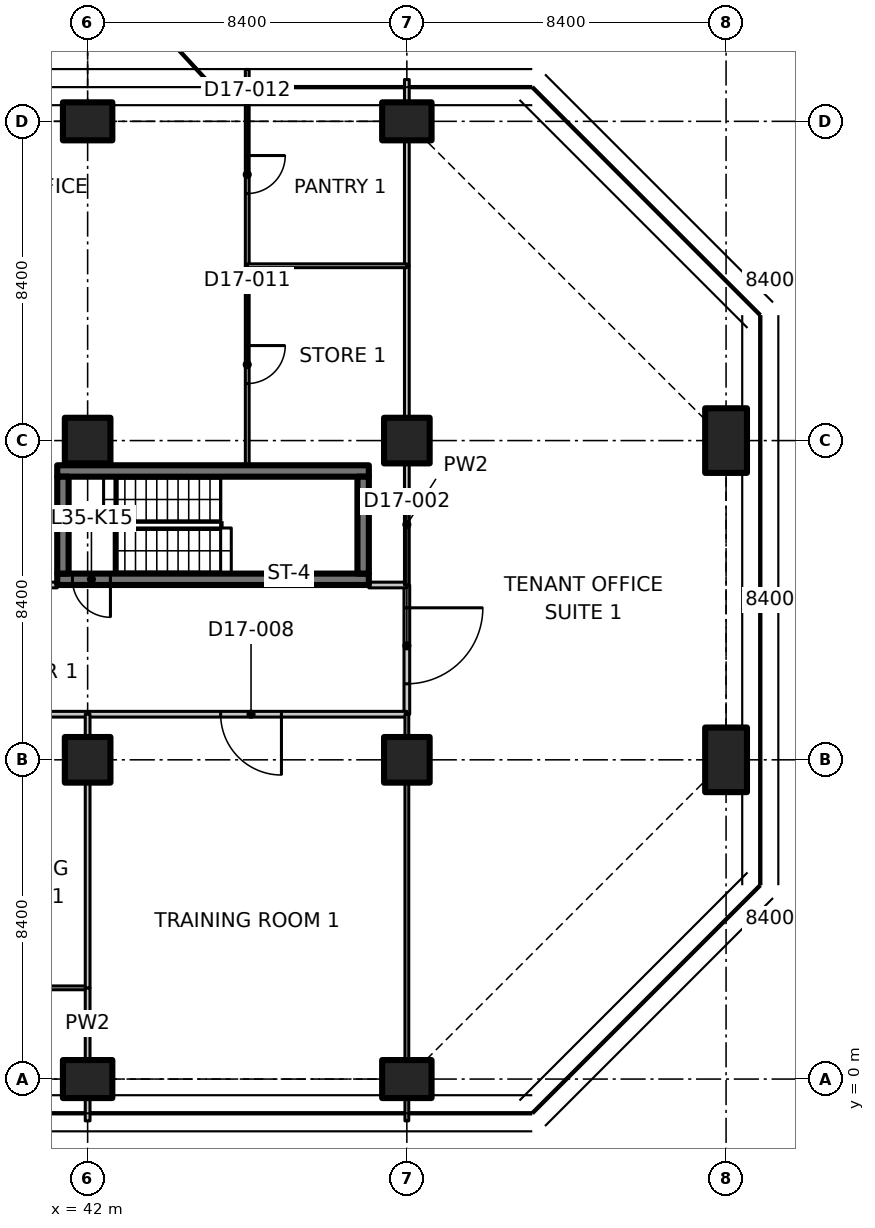
"""IFC4 building model, lengths in metres.
Left out: names, types, materials, properties, quantities, classifications, styles, units other than length and angle.
Written with IfcOpenShell. Run it as: python <this file> out.ifc"""

import sys

from ifc_helpers import new_model, si_unit, direction, frame, frame_2d, origin, origin_2d, place, context, subcontext, project, spatial, polyline, rectangle, outline, extrude, element, fill, save


model = new_model("IFC4")
c1 = context("Model", 3, precision=1e-05, world=origin(), true_north=direction((0.0, 1.0)))
c2 = subcontext(c1, "Body", "Model", "MODEL_VIEW")
j1 = project(units=[si_unit("LENGTHUNIT", "METRE"), si_unit("PLANEANGLEUNIT", "RADIAN")], contexts=[c1])
p1 = place(None, origin())
s1 = spatial("IfcSite", under=j1, at=p1, CompositionType="ELEMENT")
p2 = place(p1, origin())
s2 = spatial("IfcBuilding", under=s1, at=p2, CompositionType="ELEMENT")
p3 = place(p2, frame((0.0, 0.0, 142.1)))
s3 = spatial("IfcBuildingStorey", under=s2, at=p3, CompositionType="ELEMENT", Elevation=142.1)
p4 = place(p3, frame((42.0, 0.0, 0.0), z_axis=(0.0, 0.0, 1.0), x_axis=(0.0, 1.0, 0.0)))
e1 = element("IfcColumn", 1, at=p4, inside=s3, PredefinedType="COLUMN", context=c2, shape_type="SweptSolid", body=[
    extrude(rectangle(XDim=1.0, YDim=1.3, at=origin_2d()), origin(), (0.0, 0.0, 1.0), 3.35),
])
for number, where, z_axis, x_axis in (
    (2, (42.0, 8.4, 0.0), (0.0, 0.0, 1.0), (1.0, 0.0, 0.0)),
    (3, (42.0, 16.8, 0.0), (0.0, 0.0, 1.0), (1.0, 0.0, 0.0)),
):
    element("IfcColumn", number, at=place(p3, frame(where, z_axis=z_axis, x_axis=x_axis)), inside=s3, PredefinedType="COLUMN", context=c2, shape_type="SweptSolid", body=[
        extrude(rectangle(XDim=1.2, YDim=1.2, at=origin_2d()), origin(), (0.0, 0.0, 1.0), 3.35),
    ])
for number, where, z_axis, x_axis in (
    (4, (42.0, 25.2, 0.0), (0.0, 0.0, 1.0), (0.0, 1.0, 0.0)),
    (5, (50.4, 0.0, 0.0), (0.0, 0.0, 1.0), (0.0, 1.0, 0.0)),
):
    element("IfcColumn", number, at=place(p3, frame(where, z_axis=z_axis, x_axis=x_axis)), inside=s3, PredefinedType="COLUMN", context=c2, shape_type="SweptSolid", body=[
        extrude(rectangle(XDim=1.0, YDim=1.3, at=origin_2d()), origin(), (0.0, 0.0, 1.0), 3.35),
    ])
for number, where, z_axis, x_axis in (
    (6, (50.4, 8.4, 0.0), (0.0, 0.0, 1.0), (1.0, 0.0, 0.0)),
    (7, (50.4, 16.8, 0.0), (0.0, 0.0, 1.0), (1.0, 0.0, 0.0)),
):
    element("IfcColumn", number, at=place(p3, frame(where, z_axis=z_axis, x_axis=x_axis)), inside=s3, PredefinedType="COLUMN", context=c2, shape_type="SweptSolid", body=[
        extrude(rectangle(XDim=1.2, YDim=1.2, at=origin_2d()), origin(), (0.0, 0.0, 1.0), 3.35),
    ])
p5 = place(p3, frame((50.4, 25.2, 0.0), z_axis=(0.0, 0.0, 1.0), x_axis=(0.0, 1.0, 0.0)))
e8 = element("IfcColumn", 8, at=p5, inside=s3, PredefinedType="COLUMN", context=c2, shape_type="SweptSolid", body=[
    extrude(rectangle(XDim=1.0, YDim=1.3, at=origin_2d()), origin(), (0.0, 0.0, 1.0), 3.35),
])
for number, where, z_axis, x_axis in (
    (9, (58.8, 8.4, 0.0), (0.0, 0.0, 1.0), (1.0, 0.0, 0.0)),
    (10, (58.8, 16.8, 0.0), (0.0, 0.0, 1.0), (1.0, 0.0, 0.0)),
):
    element("IfcColumn", number, at=place(p3, frame(where, z_axis=z_axis, x_axis=x_axis)), inside=s3, PredefinedType="COLUMN", context=c2, shape_type="SweptSolid", body=[
        extrude(rectangle(XDim=1.1, YDim=1.7, at=origin_2d()), origin(), (0.0, 0.0, 1.0), 3.35),
    ])
p6 = place(p3, frame((49.4, 13.15, 0.0), z_axis=(0.0, 0.0, 1.0), x_axis=(-1.0, 0.0, 0.0)))
e11 = element("IfcWall", 11, at=p6, inside=s3, PredefinedType="SHEAR", context=c2, shape_type="SweptSolid", body=[
    extrude(rectangle(XDim=8.2, YDim=0.3, at=frame_2d((4.1, 0.0))), origin(), (0.0, 0.0, 1.0), 3.35),
])
p7 = place(p6, frame((6.8, 0.0, 0.0)))
e12 = element("IfcOpeningElement", 12, at=p7, cuts=e11, PredefinedType="OPENING", context=c2, shape_type="SweptSolid", body=[
    extrude(rectangle(XDim=1.0, YDim=2.1, at=frame_2d((0.5, 1.05))), frame((0.0, 0.16, 0.0), z_axis=(0.0, -1.0, 0.0), x_axis=(1.0, 0.0, 0.0)), (0.0, 0.0, 1.0), 0.32),
])
p8 = place(p3, frame((41.2, 16.0, 0.0), z_axis=(0.0, 0.0, 1.0), x_axis=(1.0, 0.0, 0.0)))
e13 = element("IfcWall", 13, at=p8, inside=s3, PredefinedType="SHEAR", context=c2, shape_type="SweptSolid", body=[
    extrude(rectangle(XDim=8.2, YDim=0.3, at=frame_2d((4.1, 0.0))), origin(), (0.0, 0.0, 1.0), 3.35),
])
for number, where, z_axis, x_axis in (
    (14, (41.35, 13.3, 0.0), (0.0, 0.0, 1.0), (0.0, 1.0, 0.0)),
    (15, (49.25, 13.3, 0.0), (0.0, 0.0, 1.0), (0.0, 1.0, 0.0)),
):
    element("IfcWall", number, at=place(p3, frame(where, z_axis=z_axis, x_axis=x_axis)), inside=s3, PredefinedType="SHEAR", context=c2, shape_type="SweptSolid", body=[
        extrude(rectangle(XDim=2.55, YDim=0.3, at=frame_2d((1.275, 0.0))), origin(), (0.0, 0.0, 1.0), 3.35),
    ])
p9 = place(p3, frame((50.4, 13.0, 0.0), z_axis=(0.0, 0.0, 1.0), x_axis=(0.0, -1.0, 0.0)))
e16 = element("IfcWall", 16, at=p9, inside=s3, PredefinedType="PARTITIONING", context=c2, shape_type="SweptSolid", body=[
    extrude(rectangle(XDim=3.4, YDim=0.15, at=frame_2d((1.7, 0.0))), origin(), (0.0, 0.0, 1.0), 3.33),
])
p10 = place(p9, frame((0.6, 0.0, 0.0)))
e17 = element("IfcOpeningElement", 17, at=p10, cuts=e16, PredefinedType="OPENING", context=c2, shape_type="SweptSolid", body=[
    extrude(rectangle(XDim=2.0, YDim=2.4, at=frame_2d((1.0, 1.2))), frame((0.0, 0.085, 0.0), z_axis=(0.0, -1.0, 0.0), x_axis=(1.0, 0.0, 0.0)), (0.0, 0.0, 1.0), 0.17),
])
p11 = place(p3, frame((42.0, 9.6, 0.0), z_axis=(0.0, 0.0, 1.0), x_axis=(-1.0, 0.0, 0.0)))
e18 = element("IfcWall", 18, at=p11, inside=s3, PredefinedType="PARTITIONING", context=c2, shape_type="SweptSolid", body=[
    extrude(rectangle(XDim=4.2, YDim=0.15, at=frame_2d((2.1, 0.0))), origin(), (0.0, 0.0, 1.0), 3.33),
])
p12 = place(p3, frame((50.4, 9.6, 0.0), z_axis=(0.0, 0.0, 1.0), x_axis=(-1.0, 0.0, 0.0)))
e19 = element("IfcWall", 19, at=p12, inside=s3, PredefinedType="PARTITIONING", context=c2, shape_type="SweptSolid", body=[
    extrude(rectangle(XDim=8.4, YDim=0.15, at=frame_2d((4.2, 0.0))), origin(), (0.0, 0.0, 1.0), 3.33),
])
p13 = place(p12, frame((3.3, 0.0, 0.0)))
e20 = element("IfcOpeningElement", 20, at=p13, cuts=e19, PredefinedType="OPENING", context=c2, shape_type="SweptSolid", body=[
    extrude(rectangle(XDim=1.6, YDim=2.1, at=frame_2d((0.8, 1.05))), frame((0.0, 0.085, 0.0), z_axis=(0.0, -1.0, 0.0), x_axis=(1.0, 0.0, 0.0)), (0.0, 0.0, 1.0), 0.17),
])
p14 = place(p3, frame((33.6, 13.0, 0.0), z_axis=(0.0, 0.0, 1.0), x_axis=(1.0, 0.0, 0.0)))
e21 = element("IfcWall", 21, at=p14, inside=s3, PredefinedType="PARTITIONING", context=c2, shape_type="SweptSolid", body=[
    extrude(rectangle(XDim=7.6, YDim=0.15, at=frame_2d((3.8, 0.0))), origin(), (0.0, 0.0, 1.0), 3.33),
])
p15 = place(p14, frame((3.0, 0.0, 0.0)))
e22 = element("IfcOpeningElement", 22, at=p15, cuts=e21, PredefinedType="OPENING", context=c2, shape_type="SweptSolid", body=[
    extrude(rectangle(XDim=1.8, YDim=2.1, at=frame_2d((0.9, 1.05))), frame((0.0, 0.085, 0.0), z_axis=(0.0, -1.0, 0.0), x_axis=(1.0, 0.0, 0.0)), (0.0, 0.0, 1.0), 0.17),
])
p16 = place(p3, frame((49.4, 13.0, 0.0), z_axis=(0.0, 0.0, 1.0), x_axis=(1.0, 0.0, 0.0)))
e23 = element("IfcWall", 23, at=p16, inside=s3, PredefinedType="PARTITIONING", context=c2, shape_type="SweptSolid", body=[
    extrude(rectangle(XDim=1.0, YDim=0.15, at=frame_2d((0.5, 0.0))), origin(), (0.0, 0.0, 1.0), 3.33),
])
p17 = place(p3, frame((50.4, -1.1, 0.0), z_axis=(0.0, 0.0, 1.0), x_axis=(0.0, 1.0, 0.0)))
e24 = element("IfcWall", 24, at=p17, inside=s3, PredefinedType="PARTITIONING", context=c2, shape_type="SweptSolid", body=[
    extrude(rectangle(XDim=0.58, YDim=0.1, at=frame_2d((0.29, 0.0))), origin(), (0.0, 0.0, 1.0), 3.33),
])
p18 = place(p3, frame((50.4, 0.52, 0.0), z_axis=(0.0, 0.0, 1.0), x_axis=(0.0, 1.0, 0.0)))
e25 = element("IfcWall", 25, at=p18, inside=s3, PredefinedType="PARTITIONING", context=c2, shape_type="SweptSolid", body=[
    extrude(outline(polyline([(0.0, 0.0), (7.26, 0.0), (7.26, 3.33), (0.146, 3.33), (0.144, 2.98), (0.0, 2.98), (0.0, 0.0)])), frame((0.0, 0.05, 0.0), z_axis=(0.0, -1.0, 0.0), x_axis=(1.0, 0.0, 0.0)), (0.0, 0.0, 1.0), 0.1),
])
p19 = place(p3, frame((50.4, 9.02, 0.0), z_axis=(0.0, 0.0, 1.0), x_axis=(0.0, 1.0, 0.0)))
e26 = element("IfcWall", 26, at=p19, inside=s3, PredefinedType="PARTITIONING", context=c2, shape_type="SweptSolid", body=[
    extrude(rectangle(XDim=0.58, YDim=0.1, at=frame_2d((0.29, 0.0))), origin(), (0.0, 0.0, 1.0), 3.33),
])
p20 = place(p3, frame((50.4, 13.0, 0.0), z_axis=(0.0, 0.0, 1.0), x_axis=(0.0, 1.0, 0.0)))
e27 = element("IfcWall", 27, at=p20, inside=s3, PredefinedType="PARTITIONING", context=c2, shape_type="SweptSolid", body=[
    extrude(rectangle(XDim=3.18, YDim=0.125, at=frame_2d((1.59, 0.0))), origin(), (0.0, 0.0, 1.0), 3.33),
])
p21 = place(p3, frame((50.4, 17.42, 0.0), z_axis=(0.0, 0.0, 1.0), x_axis=(0.0, 1.0, 0.0)))
e28 = element("IfcWall", 28, at=p21, inside=s3, PredefinedType="PARTITIONING", context=c2, shape_type="SweptSolid", body=[
    extrude(rectangle(XDim=3.98, YDim=0.125, at=frame_2d((1.99, 0.0))), origin(), (0.0, 0.0, 1.0), 3.33),
])
p22 = place(p3, frame((50.4, 21.4, 0.0), z_axis=(0.0, 0.0, 1.0), x_axis=(0.0, 1.0, 0.0)))
e29 = element("IfcWall", 29, at=p22, inside=s3, PredefinedType="PARTITIONING", context=c2, shape_type="SweptSolid", body=[
    extrude(rectangle(XDim=3.28, YDim=0.125, at=frame_2d((1.64, 0.0))), origin(), (0.0, 0.0, 1.0), 2.98),
])
p23 = place(p3, frame((50.4, 25.72, 0.0), z_axis=(0.0, 0.0, 1.0), x_axis=(0.0, 1.0, 0.0)))
e30 = element("IfcWall", 30, at=p23, inside=s3, PredefinedType="PARTITIONING", context=c2, shape_type="SweptSolid", body=[
    extrude(rectangle(XDim=0.58, YDim=0.125, at=frame_2d((0.29, 0.0))), origin(), (0.0, 0.0, 1.0), 3.33),
])
p24 = place(p3, frame((37.8, 2.4, 0.0), z_axis=(0.0, 0.0, 1.0), x_axis=(1.0, 0.0, 0.0)))
e31 = element("IfcWall", 31, at=p24, inside=s3, PredefinedType="PARTITIONING", context=c2, shape_type="SweptSolid", body=[
    extrude(rectangle(XDim=4.2, YDim=0.1, at=frame_2d((2.1, 0.0))), origin(), (0.0, 0.0, 1.0), 3.33),
])
p25 = place(p3, frame((42.0, 2.4, 0.0), z_axis=(0.0, 0.0, 1.0), x_axis=(0.0, -1.0, 0.0)))
e32 = element("IfcWall", 32, at=p25, inside=s3, PredefinedType="PARTITIONING", context=c2, shape_type="SweptSolid", body=[
    extrude(rectangle(XDim=1.88, YDim=0.125, at=frame_2d((0.94, 0.0))), origin(), (0.0, 0.0, 1.0), 3.33),
])
for number, where, z_axis, x_axis in (
    (33, (42.0, -0.52, 0.0), (0.0, 0.0, 1.0), (0.0, -1.0, 0.0)),
    (34, (42.0, 9.6, 0.0), (0.0, 0.0, 1.0), (0.0, -1.0, 0.0)),
):
    element("IfcWall", number, at=place(p3, frame(where, z_axis=z_axis, x_axis=x_axis)), inside=s3, PredefinedType="PARTITIONING", context=c2, shape_type="SweptSolid", body=[
        extrude(rectangle(XDim=0.58, YDim=0.125, at=frame_2d((0.29, 0.0))), origin(), (0.0, 0.0, 1.0), 3.33),
    ])
p26 = place(p3, frame((42.0, 7.78, 0.0), z_axis=(0.0, 0.0, 1.0), x_axis=(0.0, -1.0, 0.0)))
e35 = element("IfcWall", 35, at=p26, inside=s3, PredefinedType="PARTITIONING", context=c2, shape_type="SweptSolid", body=[
    extrude(rectangle(XDim=5.38, YDim=0.125, at=frame_2d((2.69, 0.0))), origin(), (0.0, 0.0, 1.0), 3.33),
])
p27 = place(p3, frame((46.2, 21.4, 0.0), z_axis=(0.0, 0.0, 1.0), x_axis=(0.0, -1.0, 0.0)))
e36 = element("IfcWall", 36, at=p27, inside=s3, PredefinedType="PARTITIONING", context=c2, shape_type="SweptSolid", body=[
    extrude(rectangle(XDim=5.25, YDim=0.1, at=frame_2d((2.625, 0.0))), origin(), (0.0, 0.0, 1.0), 3.33),
])
p28 = place(p27, frame((2.1, 0.0, 0.0)))
e37 = element("IfcOpeningElement", 37, at=p28, cuts=e36, PredefinedType="OPENING", context=c2, shape_type="SweptSolid", body=[
    extrude(rectangle(XDim=1.0, YDim=2.1, at=frame_2d((0.5, 1.05))), frame((0.0, 0.06, 0.0), z_axis=(0.0, -1.0, 0.0), x_axis=(1.0, 0.0, 0.0)), (0.0, 0.0, 1.0), 0.12),
])
p29 = place(p3, frame((46.2, 26.565, 0.0), z_axis=(0.0, 0.0, 1.0), x_axis=(0.0, -1.0, 0.0)))
e38 = element("IfcWall", 38, at=p29, inside=s3, PredefinedType="PARTITIONING", context=c2, shape_type="SweptSolid", body=[
    extrude(outline(polyline([(0.0, 0.0), (5.165, 0.0), (5.165, 3.33), (1.815, 3.33), (1.813, 2.98), (0.917, 2.98), (0.915, 3.33), (0.265, 3.33), (0.0, 3.33), (0.0, 0.0)])), frame((0.0, 0.05, 0.0), z_axis=(0.0, -1.0, 0.0), x_axis=(1.0, 0.0, 0.0)), (0.0, 0.0, 1.0), 0.1),
])
p30 = place(p29, frame((2.265, 0.0, 0.0)))
e39 = element("IfcOpeningElement", 39, at=p30, cuts=e38, PredefinedType="OPENING", context=c2, shape_type="SweptSolid", body=[
    extrude(rectangle(XDim=1.0, YDim=2.1, at=frame_2d((0.5, 1.05))), frame((0.0, 0.06, 0.0), z_axis=(0.0, -1.0, 0.0), x_axis=(1.0, 0.0, 0.0)), (0.0, 0.0, 1.0), 0.12),
])
p31 = place(p3, frame((46.2, 21.4, 0.0), z_axis=(0.0, 0.0, 1.0), x_axis=(1.0, 0.0, 0.0)))
e40 = element("IfcWall", 40, at=p31, inside=s3, PredefinedType="PARTITIONING", context=c2, shape_type="SweptSolid", body=[
    extrude(rectangle(XDim=4.2, YDim=0.1, at=frame_2d((2.1, 0.0))), origin(), (0.0, 0.0, 1.0), 3.33),
])
p32 = place(p7, origin())
e41 = element("IfcDoor", 41, at=p32, inside=s3, OperationType="SINGLE_SWING_LEFT", PredefinedType="DOOR", context=c2, shape_type="SweptSolid", body=[
    extrude(rectangle(XDim=1.0, YDim=2.1, at=frame_2d((0.5, 1.05))), frame((0.0, 0.025, 0.0), z_axis=(0.0, -1.0, 0.0), x_axis=(1.0, 0.0, 0.0)), (0.0, 0.0, 1.0), 0.05),
])
fill(e12, e41)
p33 = place(p10, origin())
e42 = element("IfcDoor", 42, at=p33, inside=s3, OperationType="DOUBLE_DOOR_SINGLE_SWING", PredefinedType="DOOR", context=c2, shape_type="SweptSolid", body=[
    extrude(rectangle(XDim=2.0, YDim=2.4, at=frame_2d((1.0, 1.2))), frame((0.0, 0.025, 0.0), z_axis=(0.0, -1.0, 0.0), x_axis=(1.0, 0.0, 0.0)), (0.0, 0.0, 1.0), 0.05),
])
fill(e17, e42)
p34 = place(p13, origin())
e43 = element("IfcDoor", 43, at=p34, inside=s3, OperationType="DOUBLE_DOOR_SINGLE_SWING", PredefinedType="DOOR", context=c2, shape_type="SweptSolid", body=[
    extrude(rectangle(XDim=1.6, YDim=2.1, at=frame_2d((0.8, 1.05))), frame((0.0, 0.025, 0.0), z_axis=(0.0, -1.0, 0.0), x_axis=(1.0, 0.0, 0.0)), (0.0, 0.0, 1.0), 0.05),
])
fill(e20, e43)
p35 = place(p28, origin())
e44 = element("IfcDoor", 44, at=p35, inside=s3, OperationType="SINGLE_SWING_LEFT", PredefinedType="DOOR", context=c2, shape_type="SweptSolid", body=[
    extrude(rectangle(XDim=1.0, YDim=2.1, at=frame_2d((0.5, 1.05))), frame((0.0, 0.025, 0.0), z_axis=(0.0, -1.0, 0.0), x_axis=(1.0, 0.0, 0.0)), (0.0, 0.0, 1.0), 0.05),
])
fill(e37, e44)
p36 = place(p30, origin())
e45 = element("IfcDoor", 45, at=p36, inside=s3, OperationType="SINGLE_SWING_LEFT", PredefinedType="DOOR", context=c2, shape_type="SweptSolid", body=[
    extrude(rectangle(XDim=1.0, YDim=2.1, at=frame_2d((0.5, 1.05))), frame((0.0, 0.025, 0.0), z_axis=(0.0, -1.0, 0.0), x_axis=(1.0, 0.0, 0.0)), (0.0, 0.0, 1.0), 0.05),
])
fill(e39, e45)
save(model, sys.argv[1])
